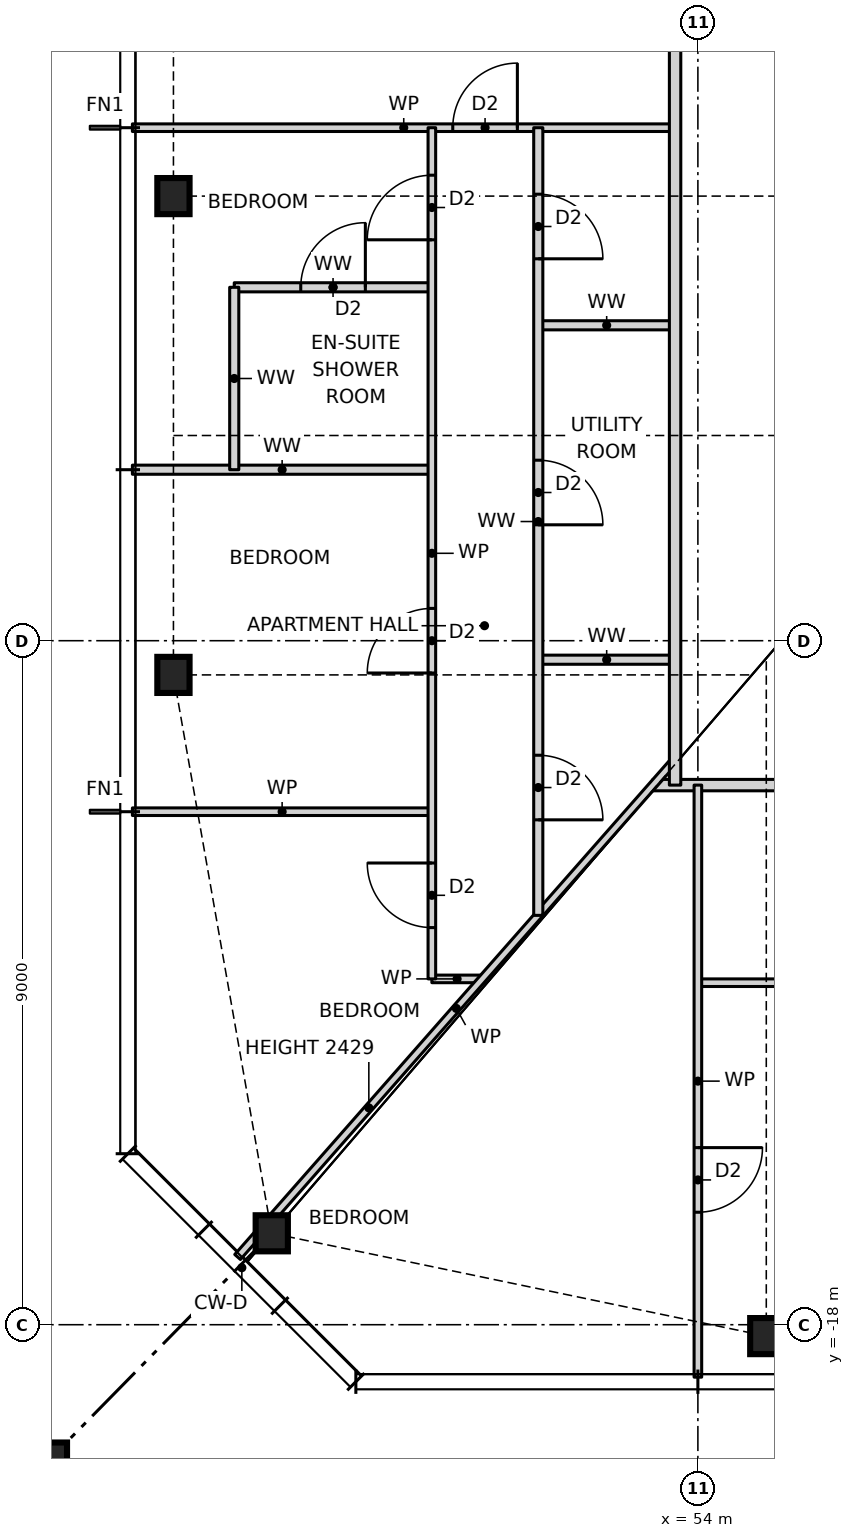
"""IFC4 building model, lengths in metres.
Left out: names, types, materials, properties, quantities, classifications, styles, units other than length and angle.
Written with IfcOpenShell. Run it as: python <this file> out.ifc"""

import sys

from ifc_helpers import new_model, si_unit, direction, frame, frame_2d, origin, origin_2d, place, context, subcontext, project, spatial, rectangle, hollow_rectangle, i_section, extrude, element, fill, save


model = new_model("IFC4")
c1 = context("Model", 3, precision=1e-05, world=origin(), true_north=direction((0.0, 1.0)))
c2 = subcontext(c1, "Body", "Model", "MODEL_VIEW")
j1 = project(units=[si_unit("LENGTHUNIT", "METRE"), si_unit("PLANEANGLEUNIT", "RADIAN")], contexts=[c1])
p1 = place(None, origin())
s1 = spatial("IfcSite", under=j1, at=p1, CompositionType="ELEMENT")
p2 = place(p1, origin())
s2 = spatial("IfcBuilding", under=s1, at=p2, CompositionType="ELEMENT")
p3 = place(p2, frame((0.0, 0.0, 64.0)))
s3 = spatial("IfcBuildingStorey", under=s2, at=p3, CompositionType="ELEMENT", Elevation=64.0)
for number, where, z_axis, x_axis in (
    (1, (48.394, -16.797, 0.0), (0.0, 0.0, 1.0), (1.0, 0.0, 0.0)),
    (2, (54.9, -18.15, 0.0), (0.0, 0.0, 1.0), (1.0, 0.0, 0.0)),
    (3, (47.1, -3.15, 0.0), (0.0, 0.0, 1.0), (1.0, 0.0, 0.0)),
    (4, (47.1, -9.45, 0.0), (0.0, 0.0, 1.0), (1.0, 0.0, 0.0)),
):
    element("IfcColumn", number, at=place(p3, frame(where, z_axis=z_axis, x_axis=x_axis)), inside=s3, PredefinedType="COLUMN", context=c2, shape_type="SweptSolid", body=[
        extrude(i_section(OverallWidth=0.424, OverallDepth=0.475, WebThickness=0.048, FlangeThickness=0.077, at=origin_2d()), origin(), (0.0, 0.0, 1.0), 3.5),
    ])
p4 = place(p3, frame((45.1, -20.15, 0.0), z_axis=(0.0, 0.0, 1.0), x_axis=(1.0, 0.0, 0.0)))
e5 = element("IfcColumn", 5, at=p4, inside=s3, PredefinedType="COLUMN", context=c2, shape_type="SweptSolid", body=[
    extrude(hollow_rectangle(XDim=1.2, YDim=1.2, WallThickness=0.07, at=origin_2d()), origin(), (0.0, 0.0, 1.0), 3.5),
])
p5 = place(p3, frame((54.0, -13.5, 0.0), z_axis=(0.0, 0.0, 1.0), x_axis=(1.0, 0.0, 0.0)))
e6 = element("IfcWall", 6, at=p5, inside=s3, PredefinedType="PARTITIONING", context=c2, shape_type="SweptSolid", body=[
    extrude(rectangle(XDim=9.0, YDim=0.1, at=frame_2d((4.5, 0.0))), origin(), (0.0, 0.0, 1.0), 3.27),
])
p6 = place(p5, frame((1.375, 0.0, 0.0)))
e7 = element("IfcOpeningElement", 7, at=p6, cuts=e6, PredefinedType="OPENING", context=c2, shape_type="SweptSolid", body=[
    extrude(rectangle(XDim=0.85, YDim=2.1, at=frame_2d((0.425, 1.05))), frame((0.0, 0.06, 0.0), z_axis=(0.0, -1.0, 0.0), x_axis=(1.0, 0.0, 0.0)), (0.0, 0.0, 1.0), 0.12),
])
p7 = place(p5, frame((4.575, 0.0, 0.0)))
e8 = element("IfcOpeningElement", 8, at=p7, cuts=e6, PredefinedType="OPENING", context=c2, shape_type="SweptSolid", body=[
    extrude(rectangle(XDim=0.85, YDim=2.1, at=frame_2d((0.425, 1.05))), frame((0.0, 0.06, 0.0), z_axis=(0.0, -1.0, 0.0), x_axis=(1.0, 0.0, 0.0)), (0.0, 0.0, 1.0), 0.12),
])
p8 = place(p3, frame((50.5, -13.45, 0.0), z_axis=(0.0, 0.0, 1.0), x_axis=(1.0, 0.0, 0.0)))
e9 = element("IfcWall", 9, at=p8, inside=s3, PredefinedType="PARTITIONING", context=c2, shape_type="SweptSolid", body=[
    extrude(rectangle(XDim=0.664, YDim=0.1, at=frame_2d((0.332, 0.0))), origin(), (0.0, 0.0, 1.0), 3.27),
])
p9 = place(p3, frame((46.56, -11.25, 0.0), z_axis=(0.0, 0.0, 1.0), x_axis=(1.0, 0.0, 0.0)))
e10 = element("IfcWall", 10, at=p9, inside=s3, PredefinedType="PARTITIONING", context=c2, shape_type="SweptSolid", body=[
    extrude(rectangle(XDim=3.94, YDim=0.1, at=frame_2d((1.97, 0.0))), origin(), (0.0, 0.0, 1.0), 3.27),
])
p10 = place(p3, frame((53.408, -10.9, 0.0), z_axis=(0.0, 0.0, 1.0), x_axis=(1.0, 0.0, 0.0)))
e11 = element("IfcWall", 11, at=p10, inside=s3, PredefinedType="PARTITIONING", context=c2, shape_type="SweptSolid", body=[
    extrude(rectangle(XDim=19.184, YDim=0.15, at=frame_2d((9.592, 0.0))), origin(), (0.0, 0.0, 1.0), 3.27),
])
p11 = place(p10, frame((5.092, 0.0, 0.0)))
e12 = element("IfcOpeningElement", 12, at=p11, cuts=e11, PredefinedType="OPENING", context=c2, shape_type="SweptSolid", body=[
    extrude(rectangle(XDim=1.0, YDim=2.1, at=frame_2d((0.5, 1.05))), frame((0.0, 0.085, 0.0), z_axis=(0.0, -1.0, 0.0), x_axis=(1.0, 0.0, 0.0)), (0.0, 0.0, 1.0), 0.17),
])
p12 = place(p10, frame((10.492, 0.0, 0.0)))
e13 = element("IfcOpeningElement", 13, at=p12, cuts=e11, PredefinedType="OPENING", context=c2, shape_type="SweptSolid", body=[
    extrude(rectangle(XDim=1.0, YDim=2.1, at=frame_2d((0.5, 1.05))), frame((0.0, 0.085, 0.0), z_axis=(0.0, -1.0, 0.0), x_axis=(1.0, 0.0, 0.0)), (0.0, 0.0, 1.0), 0.17),
])
p13 = place(p3, frame((51.9, -9.25, 0.0), z_axis=(0.0, 0.0, 1.0), x_axis=(1.0, 0.0, 0.0)))
e14 = element("IfcWall", 14, at=p13, inside=s3, PredefinedType="PARTITIONING", context=c2, shape_type="SweptSolid", body=[
    extrude(rectangle(XDim=1.8, YDim=0.12, at=frame_2d((0.9, 0.0))), origin(), (0.0, 0.0, 1.0), 3.27),
])
p14 = place(p3, frame((46.56, -6.75, 0.0), z_axis=(0.0, 0.0, 1.0), x_axis=(1.0, 0.0, 0.0)))
e15 = element("IfcWall", 15, at=p14, inside=s3, PredefinedType="PARTITIONING", context=c2, shape_type="SweptSolid", body=[
    extrude(rectangle(XDim=3.94, YDim=0.12, at=frame_2d((1.97, 0.0))), origin(), (0.0, 0.0, 1.0), 3.27),
])
p15 = place(p3, frame((51.9, -4.85, 0.0), z_axis=(0.0, 0.0, 1.0), x_axis=(1.0, 0.0, 0.0)))
e16 = element("IfcWall", 16, at=p15, inside=s3, PredefinedType="PARTITIONING", context=c2, shape_type="SweptSolid", body=[
    extrude(rectangle(XDim=1.8, YDim=0.12, at=frame_2d((0.9, 0.0))), origin(), (0.0, 0.0, 1.0), 3.27),
])
p16 = place(p3, frame((47.9, -4.35, 0.0), z_axis=(0.0, 0.0, 1.0), x_axis=(1.0, 0.0, 0.0)))
e17 = element("IfcWall", 17, at=p16, inside=s3, PredefinedType="PARTITIONING", context=c2, shape_type="SweptSolid", body=[
    extrude(rectangle(XDim=2.6, YDim=0.12, at=frame_2d((1.3, 0.0))), origin(), (0.0, 0.0, 1.0), 3.27),
])
p17 = place(p16, frame((0.875, 0.0, 0.0)))
e18 = element("IfcOpeningElement", 18, at=p17, cuts=e17, PredefinedType="OPENING", context=c2, shape_type="SweptSolid", body=[
    extrude(rectangle(XDim=0.85, YDim=2.1, at=frame_2d((0.425, 1.05))), frame((0.0, 0.07, 0.0), z_axis=(0.0, -1.0, 0.0), x_axis=(1.0, 0.0, 0.0)), (0.0, 0.0, 1.0), 0.14),
])
p18 = place(p3, frame((46.56, -2.25, 0.0), z_axis=(0.0, 0.0, 1.0), x_axis=(1.0, 0.0, 0.0)))
e19 = element("IfcWall", 19, at=p18, inside=s3, PredefinedType="PARTITIONING", context=c2, shape_type="SweptSolid", body=[
    extrude(rectangle(XDim=7.14, YDim=0.1, at=frame_2d((3.57, 0.0))), origin(), (0.0, 0.0, 1.0), 3.27),
])
p19 = place(p18, frame((4.215, 0.0, 0.0)))
e20 = element("IfcOpeningElement", 20, at=p19, cuts=e19, PredefinedType="OPENING", context=c2, shape_type="SweptSolid", body=[
    extrude(rectangle(XDim=0.85, YDim=2.1, at=frame_2d((0.425, 1.05))), frame((0.0, 0.06, 0.0), z_axis=(0.0, -1.0, 0.0), x_axis=(1.0, 0.0, 0.0)), (0.0, 0.0, 1.0), 0.12),
])
p20 = place(p3, frame((47.944, -17.109, 0.0), z_axis=(0.0, 0.0, 1.0), x_axis=(0.660612734851, 0.750726857487, 0.0)))
e21 = element("IfcWall", 21, at=p20, inside=s3, PredefinedType="PARTITIONING", context=c2, shape_type="SweptSolid", body=[
    extrude(rectangle(XDim=8.713, YDim=0.1, at=frame_2d((4.356, 0.0))), origin(), (0.0, 0.0, 1.0), 2.429),
])
p21 = place(p3, frame((54.0, -18.69, 0.0), z_axis=(0.0, 0.0, 1.0), x_axis=(0.0, 1.0, 0.0)))
e22 = element("IfcWall", 22, at=p21, inside=s3, PredefinedType="PARTITIONING", context=c2, shape_type="SweptSolid", body=[
    extrude(rectangle(XDim=7.79, YDim=0.1, at=frame_2d((3.895, 0.0))), origin(), (0.0, 0.0, 1.0), 3.27),
])
p22 = place(p21, frame((2.17, 0.0, 0.0)))
e23 = element("IfcOpeningElement", 23, at=p22, cuts=e22, PredefinedType="OPENING", context=c2, shape_type="SweptSolid", body=[
    extrude(rectangle(XDim=0.85, YDim=2.1, at=frame_2d((0.425, 1.05))), frame((0.0, 0.06, 0.0), z_axis=(0.0, -1.0, 0.0), x_axis=(1.0, 0.0, 0.0)), (0.0, 0.0, 1.0), 0.12),
])
p23 = place(p3, frame((53.7, -10.9, 0.0), z_axis=(0.0, 0.0, 1.0), x_axis=(0.0, 1.0, 0.0)))
e24 = element("IfcWall", 24, at=p23, inside=s3, PredefinedType="PARTITIONING", context=c2, shape_type="SweptSolid", body=[
    extrude(rectangle(XDim=21.468, YDim=0.15, at=frame_2d((10.734, 0.0))), origin(), (0.0, 0.0, 1.0), 3.27),
])
p24 = place(p23, frame((16.65, 0.0, 0.0)))
e25 = element("IfcOpeningElement", 25, at=p24, cuts=e24, PredefinedType="OPENING", context=c2, shape_type="SweptSolid", body=[
    extrude(rectangle(XDim=1.0, YDim=2.1, at=frame_2d((0.5, 1.05))), frame((0.0, 0.085, 0.0), z_axis=(0.0, -1.0, 0.0), x_axis=(1.0, 0.0, 0.0)), (0.0, 0.0, 1.0), 0.17),
])
p25 = place(p23, frame((11.25, 0.0, 0.0)))
e26 = element("IfcOpeningElement", 26, at=p25, cuts=e24, PredefinedType="OPENING", context=c2, shape_type="SweptSolid", body=[
    extrude(rectangle(XDim=1.0, YDim=2.1, at=frame_2d((0.5, 1.05))), frame((0.0, 0.085, 0.0), z_axis=(0.0, -1.0, 0.0), x_axis=(1.0, 0.0, 0.0)), (0.0, 0.0, 1.0), 0.17),
])
p26 = place(p3, frame((51.9, -12.614, 0.0), z_axis=(0.0, 0.0, 1.0), x_axis=(0.0, 1.0, 0.0)))
e27 = element("IfcWall", 27, at=p26, inside=s3, PredefinedType="PARTITIONING", context=c2, shape_type="SweptSolid", body=[
    extrude(rectangle(XDim=10.364, YDim=0.12, at=frame_2d((5.182, 0.0))), origin(), (0.0, 0.0, 1.0), 3.27),
])
p27 = place(p26, frame((8.639, 0.0, 0.0)))
e28 = element("IfcOpeningElement", 28, at=p27, cuts=e27, PredefinedType="OPENING", context=c2, shape_type="SweptSolid", body=[
    extrude(rectangle(XDim=0.85, YDim=2.1, at=frame_2d((0.425, 1.05))), frame((0.0, 0.07, 0.0), z_axis=(0.0, -1.0, 0.0), x_axis=(1.0, 0.0, 0.0)), (0.0, 0.0, 1.0), 0.14),
])
p28 = place(p26, frame((5.139, 0.0, 0.0)))
e29 = element("IfcOpeningElement", 29, at=p28, cuts=e27, PredefinedType="OPENING", context=c2, shape_type="SweptSolid", body=[
    extrude(rectangle(XDim=0.85, YDim=2.1, at=frame_2d((0.425, 1.05))), frame((0.0, 0.07, 0.0), z_axis=(0.0, -1.0, 0.0), x_axis=(1.0, 0.0, 0.0)), (0.0, 0.0, 1.0), 0.14),
])
p29 = place(p26, frame((1.257, 0.0, 0.0)))
e30 = element("IfcOpeningElement", 30, at=p29, cuts=e27, PredefinedType="OPENING", context=c2, shape_type="SweptSolid", body=[
    extrude(rectangle(XDim=0.85, YDim=2.1, at=frame_2d((0.425, 1.05))), frame((0.0, 0.07, 0.0), z_axis=(0.0, -1.0, 0.0), x_axis=(1.0, 0.0, 0.0)), (0.0, 0.0, 1.0), 0.14),
])
p30 = place(p3, frame((50.5, -13.45, 0.0), z_axis=(0.0, 0.0, 1.0), x_axis=(0.0, 1.0, 0.0)))
e31 = element("IfcWall", 31, at=p30, inside=s3, PredefinedType="PARTITIONING", context=c2, shape_type="SweptSolid", body=[
    extrude(rectangle(XDim=11.2, YDim=0.1, at=frame_2d((5.6, 0.0))), origin(), (0.0, 0.0, 1.0), 3.27),
])
p31 = place(p30, frame((9.725, 0.0, 0.0)))
e32 = element("IfcOpeningElement", 32, at=p31, cuts=e31, PredefinedType="OPENING", context=c2, shape_type="SweptSolid", body=[
    extrude(rectangle(XDim=0.85, YDim=2.1, at=frame_2d((0.425, 1.05))), frame((0.0, 0.06, 0.0), z_axis=(0.0, -1.0, 0.0), x_axis=(1.0, 0.0, 0.0)), (0.0, 0.0, 1.0), 0.12),
])
p32 = place(p30, frame((4.025, 0.0, 0.0)))
e33 = element("IfcOpeningElement", 33, at=p32, cuts=e31, PredefinedType="OPENING", context=c2, shape_type="SweptSolid", body=[
    extrude(rectangle(XDim=0.85, YDim=2.1, at=frame_2d((0.425, 1.05))), frame((0.0, 0.06, 0.0), z_axis=(0.0, -1.0, 0.0), x_axis=(1.0, 0.0, 0.0)), (0.0, 0.0, 1.0), 0.12),
])
p33 = place(p30, frame((0.675, 0.0, 0.0)))
e34 = element("IfcOpeningElement", 34, at=p33, cuts=e31, PredefinedType="OPENING", context=c2, shape_type="SweptSolid", body=[
    extrude(rectangle(XDim=0.85, YDim=2.1, at=frame_2d((0.425, 1.05))), frame((0.0, 0.06, 0.0), z_axis=(0.0, -1.0, 0.0), x_axis=(1.0, 0.0, 0.0)), (0.0, 0.0, 1.0), 0.12),
])
p34 = place(p3, frame((47.9, -6.75, 0.0), z_axis=(0.0, 0.0, 1.0), x_axis=(0.0, 1.0, 0.0)))
e35 = element("IfcWall", 35, at=p34, inside=s3, PredefinedType="PARTITIONING", context=c2, shape_type="SweptSolid", body=[
    extrude(rectangle(XDim=2.4, YDim=0.12, at=frame_2d((1.2, 0.0))), origin(), (0.0, 0.0, 1.0), 3.27),
])
p35 = place(p22, frame((0.85, 0.0, 0.0), z_axis=(0.0, 0.0, 1.0), x_axis=(-1.0, 0.0, 0.0)))
e36 = element("IfcDoor", 36, at=p35, inside=s3, OperationType="SINGLE_SWING_LEFT", PredefinedType="DOOR", context=c2, shape_type="SweptSolid", body=[
    extrude(rectangle(XDim=0.85, YDim=2.1, at=frame_2d((0.425, 1.05))), frame((0.0, 0.025, 0.0), z_axis=(0.0, -1.0, 0.0), x_axis=(1.0, 0.0, 0.0)), (0.0, 0.0, 1.0), 0.05),
])
fill(e23, e36)
p36 = place(p19, origin())
e37 = element("IfcDoor", 37, at=p36, inside=s3, OperationType="SINGLE_SWING_RIGHT", PredefinedType="DOOR", context=c2, shape_type="SweptSolid", body=[
    extrude(rectangle(XDim=0.85, YDim=2.1, at=frame_2d((0.425, 1.05))), frame((0.0, 0.025, 0.0), z_axis=(0.0, -1.0, 0.0), x_axis=(1.0, 0.0, 0.0)), (0.0, 0.0, 1.0), 0.05),
])
fill(e20, e37)
p37 = place(p17, origin())
e38 = element("IfcDoor", 38, at=p37, inside=s3, OperationType="SINGLE_SWING_RIGHT", PredefinedType="DOOR", context=c2, shape_type="SweptSolid", body=[
    extrude(rectangle(XDim=0.85, YDim=2.1, at=frame_2d((0.425, 1.05))), frame((0.0, 0.025, 0.0), z_axis=(0.0, -1.0, 0.0), x_axis=(1.0, 0.0, 0.0)), (0.0, 0.0, 1.0), 0.05),
])
fill(e18, e38)
p38 = place(p31, origin())
e39 = element("IfcDoor", 39, at=p38, inside=s3, OperationType="SINGLE_SWING_LEFT", PredefinedType="DOOR", context=c2, shape_type="SweptSolid", body=[
    extrude(rectangle(XDim=0.85, YDim=2.1, at=frame_2d((0.425, 1.05))), frame((0.0, 0.025, 0.0), z_axis=(0.0, -1.0, 0.0), x_axis=(1.0, 0.0, 0.0)), (0.0, 0.0, 1.0), 0.05),
])
fill(e32, e39)
p39 = place(p32, origin())
e40 = element("IfcDoor", 40, at=p39, inside=s3, OperationType="SINGLE_SWING_LEFT", PredefinedType="DOOR", context=c2, shape_type="SweptSolid", body=[
    extrude(rectangle(XDim=0.85, YDim=2.1, at=frame_2d((0.425, 1.05))), frame((0.0, 0.025, 0.0), z_axis=(0.0, -1.0, 0.0), x_axis=(1.0, 0.0, 0.0)), (0.0, 0.0, 1.0), 0.05),
])
fill(e33, e40)
p40 = place(p33, origin())
e41 = element("IfcDoor", 41, at=p40, inside=s3, OperationType="SINGLE_SWING_RIGHT", PredefinedType="DOOR", context=c2, shape_type="SweptSolid", body=[
    extrude(rectangle(XDim=0.85, YDim=2.1, at=frame_2d((0.425, 1.05))), frame((0.0, 0.025, 0.0), z_axis=(0.0, -1.0, 0.0), x_axis=(1.0, 0.0, 0.0)), (0.0, 0.0, 1.0), 0.05),
])
fill(e34, e41)
p41 = place(p27, frame((0.85, 0.0, 0.0), z_axis=(0.0, 0.0, 1.0), x_axis=(-1.0, 0.0, 0.0)))
e42 = element("IfcDoor", 42, at=p41, inside=s3, OperationType="SINGLE_SWING_RIGHT", PredefinedType="DOOR", context=c2, shape_type="SweptSolid", body=[
    extrude(rectangle(XDim=0.85, YDim=2.1, at=frame_2d((0.425, 1.05))), frame((0.0, 0.025, 0.0), z_axis=(0.0, -1.0, 0.0), x_axis=(1.0, 0.0, 0.0)), (0.0, 0.0, 1.0), 0.05),
])
fill(e28, e42)
p42 = place(p28, frame((0.85, 0.0, 0.0), z_axis=(0.0, 0.0, 1.0), x_axis=(-1.0, 0.0, 0.0)))
e43 = element("IfcDoor", 43, at=p42, inside=s3, OperationType="SINGLE_SWING_RIGHT", PredefinedType="DOOR", context=c2, shape_type="SweptSolid", body=[
    extrude(rectangle(XDim=0.85, YDim=2.1, at=frame_2d((0.425, 1.05))), frame((0.0, 0.025, 0.0), z_axis=(0.0, -1.0, 0.0), x_axis=(1.0, 0.0, 0.0)), (0.0, 0.0, 1.0), 0.05),
])
fill(e29, e43)
p43 = place(p29, frame((0.85, 0.0, 0.0), z_axis=(0.0, 0.0, 1.0), x_axis=(-1.0, 0.0, 0.0)))
e44 = element("IfcDoor", 44, at=p43, inside=s3, OperationType="SINGLE_SWING_RIGHT", PredefinedType="DOOR", context=c2, shape_type="SweptSolid", body=[
    extrude(rectangle(XDim=0.85, YDim=2.1, at=frame_2d((0.425, 1.05))), frame((0.0, 0.025, 0.0), z_axis=(0.0, -1.0, 0.0), x_axis=(1.0, 0.0, 0.0)), (0.0, 0.0, 1.0), 0.05),
])
fill(e30, e44)
save(model, sys.argv[1])
